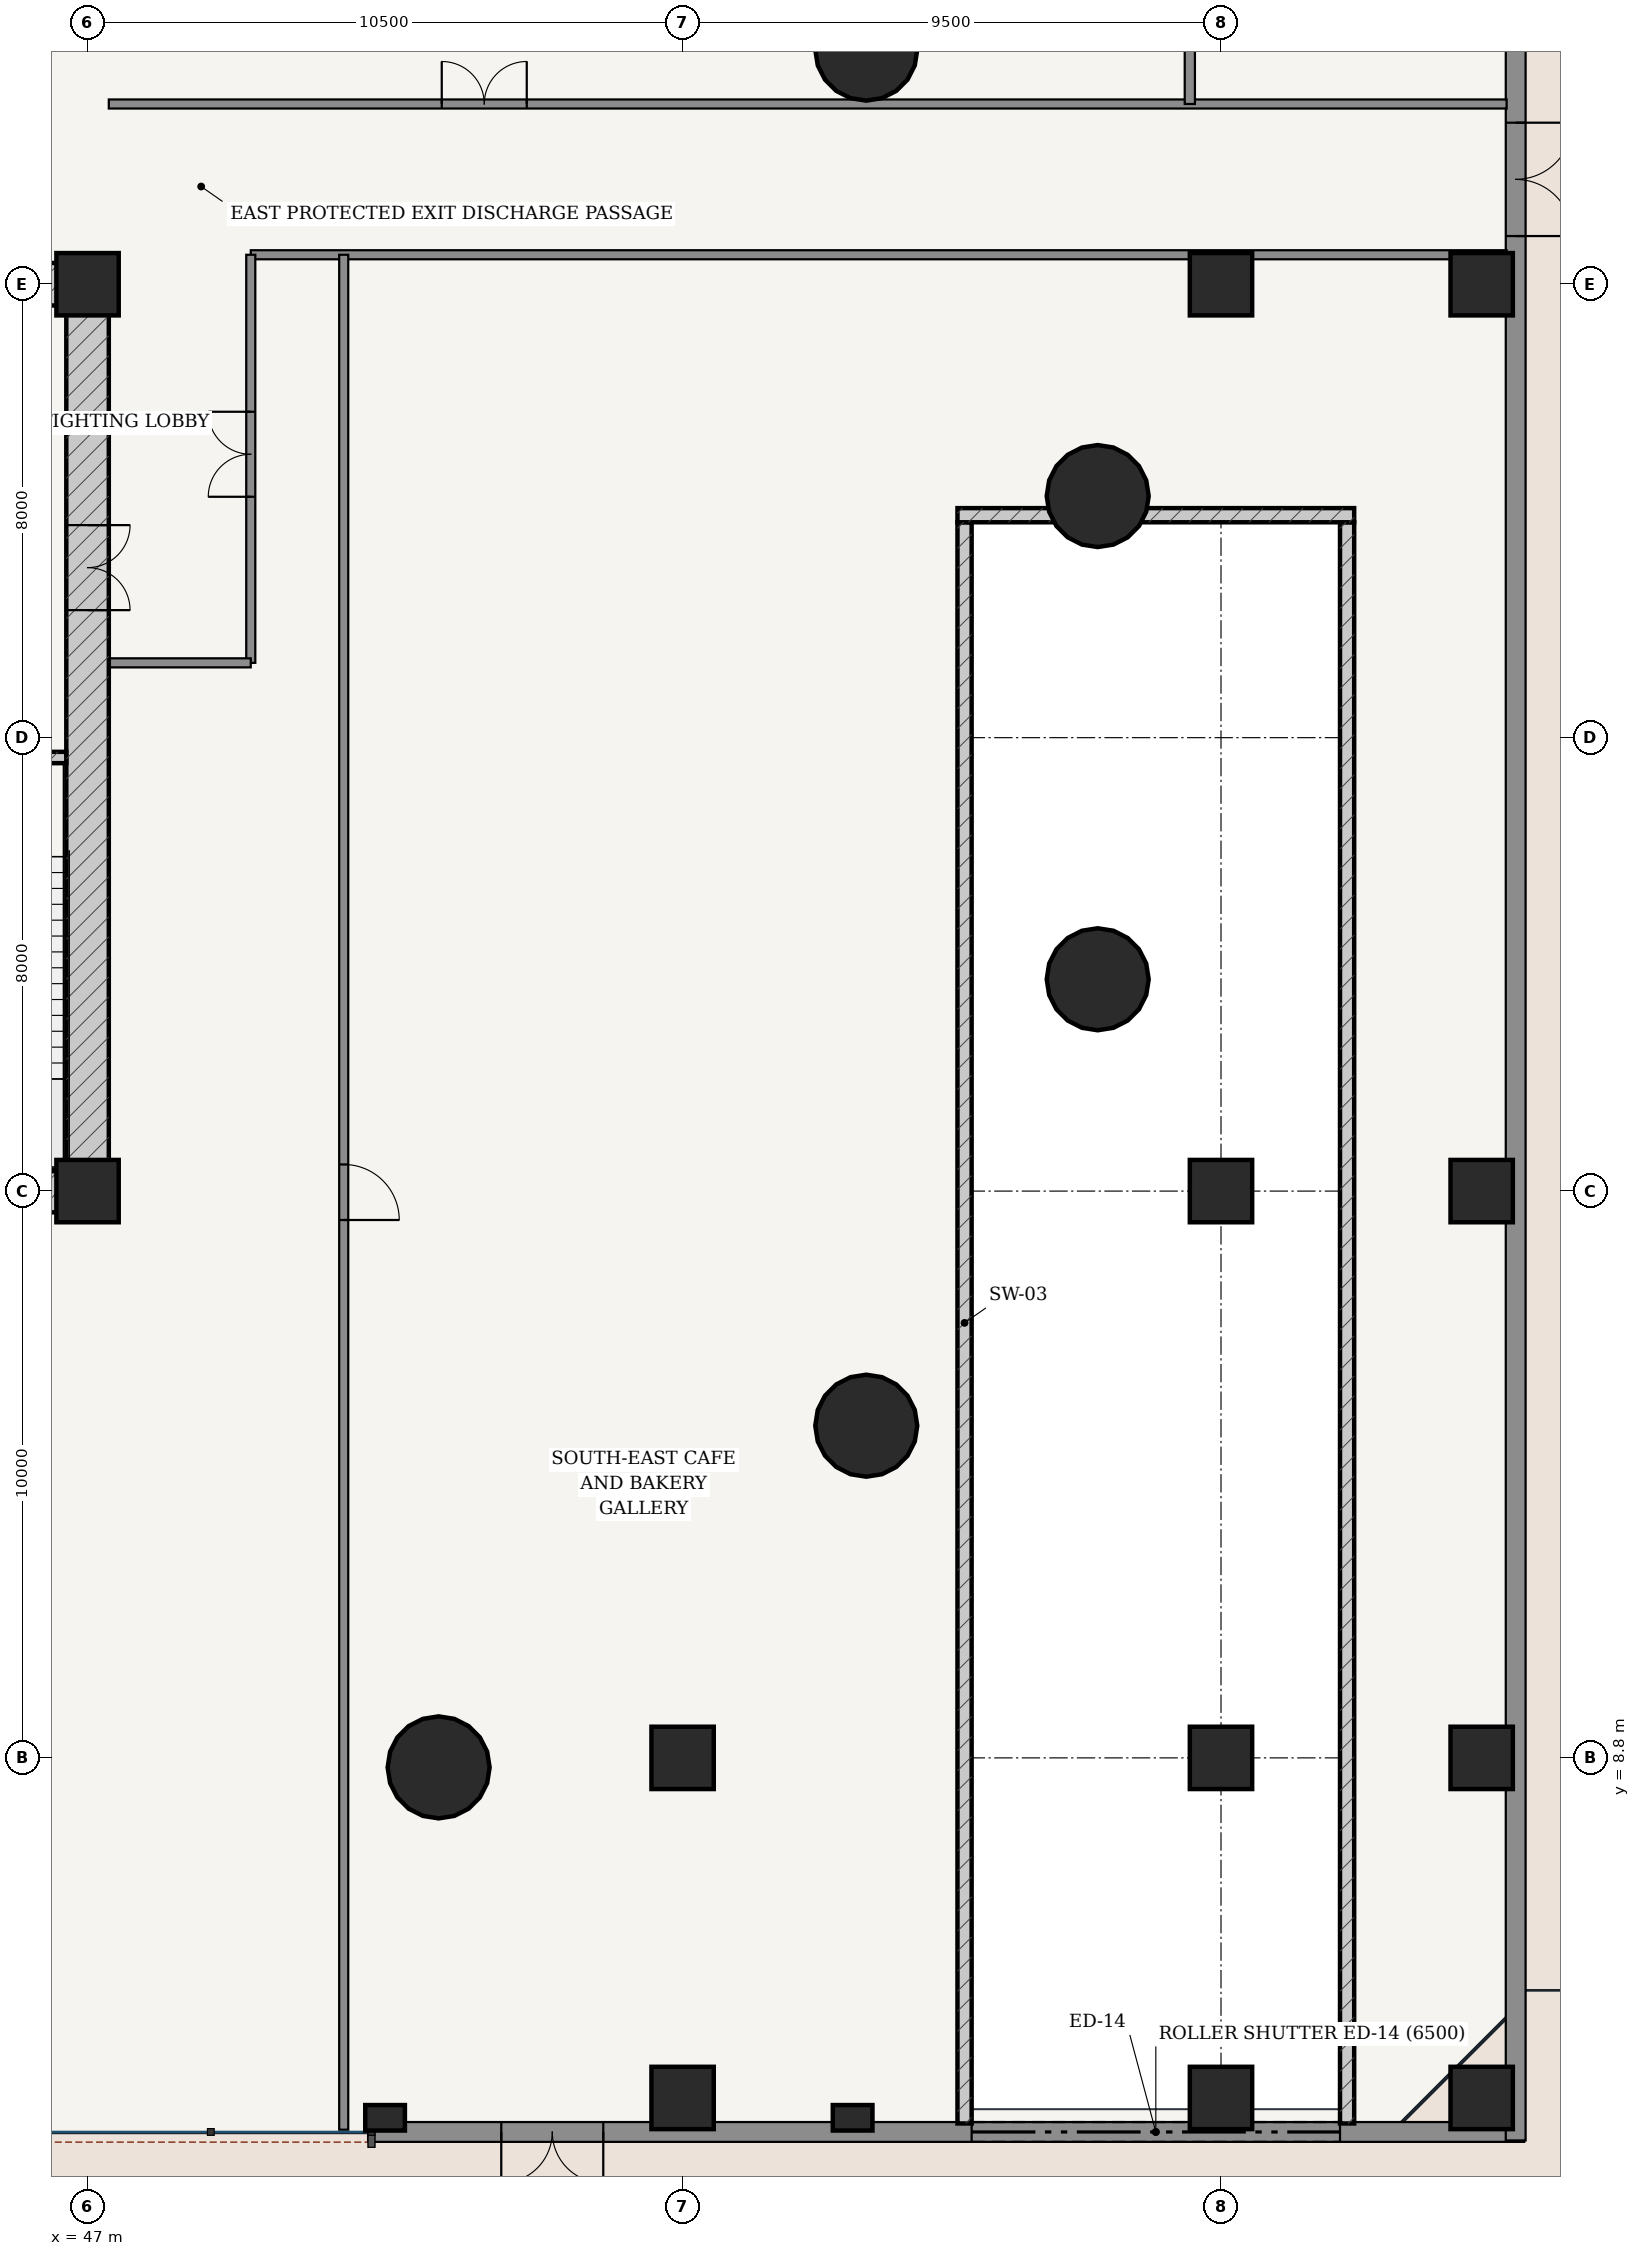
"""IFC4 building model, lengths in metres.
Left out: names, types, materials, properties, quantities, classifications, styles, units other than length and angle.
Written with IfcOpenShell. Run it as: python <this file> out.ifc"""

import sys

from ifc_helpers import new_model, si_unit, direction, frame, frame_2d, origin, origin_2d, place, context, subcontext, project, spatial, rectangle, hollow_circle, extrude, source, transform, mapped, element, fill, save


model = new_model("IFC4")
c1 = context("Model", 3, precision=1e-05, world=origin(), true_north=direction((-0.2419218956, 0.970295726276)))
c2 = subcontext(c1, "Body", "Model", "MODEL_VIEW")
j1 = project(units=[si_unit("LENGTHUNIT", "METRE"), si_unit("PLANEANGLEUNIT", "RADIAN")], contexts=[c1])
p1 = place(None, origin())
s1 = spatial("IfcSite", under=j1, at=p1, CompositionType="ELEMENT")
p2 = place(p1, origin())
s2 = spatial("IfcBuilding", under=s1, at=p2, CompositionType="ELEMENT")
p3 = place(p2, origin())
s3 = spatial("IfcBuildingStorey", under=s2, at=p3, CompositionType="ELEMENT", Elevation=0.0)
for number, where, z_axis, x_axis in (
    (1, (47.0, 18.8, 0.0), (0.0, 0.0, 1.0), (1.0, 0.0, 0.0)),
    (2, (47.0, 34.8, 0.0), (0.0, 0.0, 1.0), (1.0, 0.0, 0.0)),
):
    element("IfcColumn", number, at=place(p3, frame(where, z_axis=z_axis, x_axis=x_axis)), inside=s3, PredefinedType="COLUMN", context=c2, shape_type="SweptSolid", body=[
        extrude(rectangle(XDim=1.1, YDim=1.1, at=origin_2d()), origin(), (0.0, 0.0, 1.0), 5.4),
    ])
p4 = place(p3, frame((28.625, 18.8, 0.0), z_axis=(0.0, 0.0, 1.0), x_axis=(1.0, 0.0, 0.0)))
e3 = element("IfcWall", 3, at=p4, inside=s3, PredefinedType="SHEAR", context=c2, shape_type="SweptSolid", body=[
    extrude(rectangle(XDim=18.75, YDim=0.75, at=frame_2d((9.375, 0.0))), origin(), (0.0, 0.0, 1.0), 5.1),
])
p5 = place(p4, frame((7.627, 0.0, 0.0)))
e4 = element("IfcOpeningElement", 4, at=p5, cuts=e3, PredefinedType="OPENING", context=c2, shape_type="SweptSolid", body=[
    extrude(rectangle(XDim=0.85, YDim=2.1, at=frame_2d((0.425, 1.05))), frame((0.0, 0.385, 0.0), z_axis=(0.0, -1.0, 0.0), x_axis=(1.0, 0.0, 0.0)), (0.0, 0.0, 1.0), 0.77),
])
p6 = place(p4, frame((10.673, 0.0, 0.0)))
e5 = element("IfcOpeningElement", 5, at=p6, cuts=e3, PredefinedType="OPENING", context=c2, shape_type="SweptSolid", body=[
    extrude(rectangle(XDim=0.85, YDim=2.1, at=frame_2d((0.425, 1.05))), frame((0.0, 0.385, 0.0), z_axis=(0.0, -1.0, 0.0), x_axis=(1.0, 0.0, 0.0)), (0.0, 0.0, 1.0), 0.77),
])
p7 = place(p3, frame((28.625, 34.8, 0.0), z_axis=(0.0, 0.0, 1.0), x_axis=(1.0, 0.0, 0.0)))
e6 = element("IfcWall", 6, at=p7, inside=s3, PredefinedType="SHEAR", context=c2, shape_type="SweptSolid", body=[
    extrude(rectangle(XDim=18.75, YDim=0.75, at=frame_2d((9.375, 0.0))), origin(), (0.0, 0.0, 1.0), 5.1),
])
p8 = place(p7, frame((6.887, 0.0, 0.0)))
e7 = element("IfcOpeningElement", 7, at=p8, cuts=e6, PredefinedType="OPENING", context=c2, shape_type="SweptSolid", body=[
    extrude(rectangle(XDim=0.85, YDim=2.1, at=frame_2d((0.425, 1.05))), frame((0.0, 0.385, 0.0), z_axis=(0.0, -1.0, 0.0), x_axis=(1.0, 0.0, 0.0)), (0.0, 0.0, 1.0), 0.77),
])
p9 = place(p7, frame((8.945, 0.0, 0.0)))
e8 = element("IfcOpeningElement", 8, at=p9, cuts=e6, PredefinedType="OPENING", context=c2, shape_type="SweptSolid", body=[
    extrude(rectangle(XDim=0.86, YDim=2.1, at=frame_2d((0.43, 1.05))), frame((0.0, 0.385, 0.0), z_axis=(0.0, -1.0, 0.0), x_axis=(1.0, 0.0, 0.0)), (0.0, 0.0, 1.0), 0.77),
])
p10 = place(p7, frame((11.012, 0.0, 0.0)))
e9 = element("IfcOpeningElement", 9, at=p10, cuts=e6, PredefinedType="OPENING", context=c2, shape_type="SweptSolid", body=[
    extrude(rectangle(XDim=0.85, YDim=2.1, at=frame_2d((0.425, 1.05))), frame((0.0, 0.385, 0.0), z_axis=(0.0, -1.0, 0.0), x_axis=(1.0, 0.0, 0.0)), (0.0, 0.0, 1.0), 0.77),
])
p11 = place(p3, frame((47.0, 19.175, 0.0), z_axis=(0.0, 0.0, 1.0), x_axis=(0.0, 1.0, 0.0)))
e10 = element("IfcWall", 10, at=p11, inside=s3, PredefinedType="SHEAR", context=c2, shape_type="SweptSolid", body=[
    extrude(rectangle(XDim=15.25, YDim=0.75, at=frame_2d((7.625, 0.0))), origin(), (0.0, 0.0, 1.0), 5.1),
])
p12 = place(p11, frame((9.875, 0.0, 0.0)))
e11 = element("IfcOpeningElement", 11, at=p12, cuts=e10, PredefinedType="OPENING", context=c2, shape_type="SweptSolid", body=[
    extrude(rectangle(XDim=1.5, YDim=2.2, at=frame_2d((0.75, 1.1))), frame((0.0, 0.385, 0.0), z_axis=(0.0, -1.0, 0.0), x_axis=(1.0, 0.0, 0.0)), (0.0, 0.0, 1.0), 0.77),
])
p13 = place(p3, frame((43.305, 26.45, 0.0), z_axis=(0.0, 0.0, 1.0), x_axis=(1.0, 0.0, 0.0)))
e12 = element("IfcWall", 12, at=p13, inside=s3, PredefinedType="SOLIDWALL", context=c2, shape_type="SweptSolid", body=[
    extrude(rectangle(XDim=3.32, YDim=0.2, at=frame_2d((1.66, 0.0))), origin(), (0.0, 0.0, 1.0), 5.1),
])
p14 = place(p13, frame((1.185, 0.0, 0.0)))
e13 = element("IfcOpeningElement", 13, at=p14, cuts=e12, PredefinedType="OPENING", context=c2, shape_type="SweptSolid", body=[
    extrude(rectangle(XDim=0.95, YDim=2.15, at=frame_2d((0.475, 1.075))), frame((0.0, 0.11, 0.0), z_axis=(0.0, -1.0, 0.0), x_axis=(1.0, 0.0, 0.0)), (0.0, 0.0, 1.0), 0.22),
])
for number, where, z_axis, x_axis in (
    (14, (62.475, 2.35, 0.0), (0.0, 0.0, 1.0), (0.0, 1.0, 0.0)),
    (15, (69.225, 2.35, 0.0), (0.0, 0.0, 1.0), (0.0, 1.0, 0.0)),
):
    element("IfcWall", number, at=place(p3, frame(where, z_axis=z_axis, x_axis=x_axis)), inside=s3, PredefinedType="SOLIDWALL", context=c2, shape_type="SweptSolid", body=[
        extrude(rectangle(XDim=28.25, YDim=0.25, at=frame_2d((14.125, 0.0))), origin(), (0.0, 0.0, 1.0), 5.1),
    ])
p15 = place(p3, frame((62.35, 30.725, 0.0), z_axis=(0.0, 0.0, 1.0), x_axis=(1.0, 0.0, 0.0)))
e16 = element("IfcWall", 16, at=p15, inside=s3, PredefinedType="SOLIDWALL", context=c2, shape_type="SweptSolid", body=[
    extrude(rectangle(XDim=7.0, YDim=0.25, at=frame_2d((3.5, 0.0))), origin(), (0.0, 0.0, 1.0), 5.1),
])
for number, where, z_axis, x_axis in (
    (17, (64.824, 31.063, 0.0), (0.0, 0.0, 1.0), (1.0, 0.0, 0.0)),
    (18, (60.741, 38.939, 0.0), (0.0, 0.0, 1.0), (1.0, 0.0, 0.0)),
    (19, (53.195, 8.632, 0.0), (0.0, 0.0, 1.0), (1.0, 0.0, 0.0)),
    (20, (60.741, 14.661, 0.0), (0.0, 0.0, 1.0), (1.0, 0.0, 0.0)),
    (21, (64.824, 22.537, 0.0), (0.0, 0.0, 1.0), (1.0, 0.0, 0.0)),
):
    element("IfcColumn", number, at=place(p3, frame(where, z_axis=z_axis, x_axis=x_axis)), inside=s3, PredefinedType="COLUMN", context=c2, shape_type="SweptSolid", body=[
        extrude(hollow_circle(Radius=0.9, WallThickness=0.055, at=origin_2d()), origin(), (0.0, 0.0, 1.0), 5.4),
    ])
for number, where, z_axis, x_axis in (
    (22, (57.5, 2.8, 0.0), (0.0, 0.0, 1.0), (1.0, 0.0, 0.0)),
    (23, (57.5, 8.8, 0.0), (0.0, 0.0, 1.0), (1.0, 0.0, 0.0)),
    (24, (67.0, 2.8, 0.0), (0.0, 0.0, 1.0), (1.0, 0.0, 0.0)),
    (25, (67.0, 8.8, 0.0), (0.0, 0.0, 1.0), (1.0, 0.0, 0.0)),
    (26, (67.0, 18.8, 0.0), (0.0, 0.0, 1.0), (1.0, 0.0, 0.0)),
    (27, (67.0, 34.8, 0.0), (0.0, 0.0, 1.0), (1.0, 0.0, 0.0)),
    (28, (71.6, 2.8, 0.0), (0.0, 0.0, 1.0), (1.0, 0.0, 0.0)),
    (29, (71.6, 8.8, 0.0), (0.0, 0.0, 1.0), (1.0, 0.0, 0.0)),
    (30, (71.6, 18.8, 0.0), (0.0, 0.0, 1.0), (1.0, 0.0, 0.0)),
    (31, (71.6, 34.8, 0.0), (0.0, 0.0, 1.0), (1.0, 0.0, 0.0)),
):
    element("IfcColumn", number, at=place(p3, frame(where, z_axis=z_axis, x_axis=x_axis)), inside=s3, PredefinedType="COLUMN", context=c2, shape_type="SweptSolid", body=[
        extrude(rectangle(XDim=1.1, YDim=1.1, at=origin_2d()), origin(), (0.0, 0.0, 1.0), 5.4),
    ])
for number, where, z_axis, x_axis in (
    (32, (52.25, 2.45, 0.0), (0.0, 0.0, 1.0), (1.0, 0.0, 0.0)),
    (33, (60.5, 2.45, 0.0), (0.0, 0.0, 1.0), (1.0, 0.0, 0.0)),
):
    element("IfcColumn", number, at=place(p3, frame(where, z_axis=z_axis, x_axis=x_axis)), inside=s3, PredefinedType="PILASTER", context=c2, shape_type="SweptSolid", body=[
        extrude(rectangle(XDim=0.7, YDim=0.45, at=origin_2d()), origin(), (0.0, 0.0, 1.0), 5.4),
    ])
p16 = place(p3, frame((51.95, 2.2, 0.0), z_axis=(0.0, 0.0, 1.0), x_axis=(1.0, 0.0, 0.0)))
e34 = element("IfcWall", 34, at=p16, inside=s3, PredefinedType="SOLIDWALL", context=c2, shape_type="SweptSolid", body=[
    extrude(rectangle(XDim=20.4, YDim=0.35, at=frame_2d((10.2, 0.0))), origin(), (0.0, 0.0, 1.0), 5.1),
])
p17 = place(p16, frame((2.35, 0.0, 0.0)))
e35 = element("IfcOpeningElement", 35, at=p17, cuts=e34, PredefinedType="OPENING", context=c2, shape_type="SweptSolid", body=[
    extrude(rectangle(XDim=1.8, YDim=2.4, at=frame_2d((0.9, 1.2))), frame((0.0, 0.185, 0.0), z_axis=(0.0, -1.0, 0.0), x_axis=(1.0, 0.0, 0.0)), (0.0, 0.0, 1.0), 0.37),
])
p18 = place(p16, frame((10.65, 0.0, 0.0)))
e36 = element("IfcOpeningElement", 36, at=p18, cuts=e34, PredefinedType="OPENING", context=c2, shape_type="SweptSolid", body=[
    extrude(rectangle(XDim=6.5, YDim=2.8, at=frame_2d((3.25, 1.4))), frame((0.0, 0.185, 0.0), z_axis=(0.0, -1.0, 0.0), x_axis=(1.0, 0.0, 0.0)), (0.0, 0.0, 1.0), 0.37),
])
p19 = place(p3, frame((72.2, 2.05, 0.0), z_axis=(0.0, 0.0, 1.0), x_axis=(0.0, 1.0, 0.0)))
e37 = element("IfcWall", 37, at=p19, inside=s3, PredefinedType="SOLIDWALL", context=c2, shape_type="SweptSolid", body=[
    extrude(rectangle(XDim=49.5, YDim=0.35, at=frame_2d((24.75, 0.0))), origin(), (0.0, 0.0, 1.0), 5.1),
])
p20 = place(p19, frame((33.6, 0.0, 0.0)))
e38 = element("IfcOpeningElement", 38, at=p20, cuts=e37, PredefinedType="OPENING", context=c2, shape_type="SweptSolid", body=[
    extrude(rectangle(XDim=2.0, YDim=2.2, at=frame_2d((1.0, 1.1))), frame((0.0, 0.185, 0.0), z_axis=(0.0, -1.0, 0.0), x_axis=(1.0, 0.0, 0.0)), (0.0, 0.0, 1.0), 0.37),
])
p21 = place(p3, frame((49.88, 35.32, 0.0), z_axis=(0.0, 0.0, 1.0), x_axis=(1.0, 0.0, 0.0)))
e39 = element("IfcWall", 39, at=p21, inside=s3, PredefinedType="PARTITIONING", context=c2, shape_type="SweptSolid", body=[
    extrude(rectangle(XDim=22.16, YDim=0.16, at=frame_2d((11.08, 0.0))), origin(), (0.0, 0.0, 1.0), 4.135),
])
p22 = place(p3, frame((49.88, 28.12, 0.0), z_axis=(0.0, 0.0, 1.0), x_axis=(0.0, 1.0, 0.0)))
e40 = element("IfcWall", 40, at=p22, inside=s3, PredefinedType="PARTITIONING", context=c2, shape_type="SweptSolid", body=[
    extrude(rectangle(XDim=7.2, YDim=0.16, at=frame_2d((3.6, 0.0))), origin(), (0.0, 0.0, 1.0), 4.45),
])
p23 = place(p22, frame((2.93, 0.0, 0.0)))
e41 = element("IfcOpeningElement", 41, at=p23, cuts=e40, PredefinedType="OPENING", context=c2, shape_type="SweptSolid", body=[
    extrude(rectangle(XDim=1.5, YDim=2.2, at=frame_2d((0.75, 1.1))), frame((0.0, 0.09, 0.0), z_axis=(0.0, -1.0, 0.0), x_axis=(1.0, 0.0, 0.0)), (0.0, 0.0, 1.0), 0.18),
])
p24 = place(p3, frame((47.375, 28.12, 0.0), z_axis=(0.0, 0.0, 1.0), x_axis=(1.0, 0.0, 0.0)))
e42 = element("IfcWall", 42, at=p24, inside=s3, PredefinedType="PARTITIONING", context=c2, shape_type="SweptSolid", body=[
    extrude(rectangle(XDim=2.505, YDim=0.16, at=frame_2d((1.252, 0.0))), origin(), (0.0, 0.0, 1.0), 4.45),
])
p25 = place(p3, frame((47.375, 37.98, 0.0), z_axis=(0.0, 0.0, 1.0), x_axis=(1.0, 0.0, 0.0)))
e43 = element("IfcWall", 43, at=p25, inside=s3, PredefinedType="PARTITIONING", context=c2, shape_type="SweptSolid", body=[
    extrude(rectangle(XDim=24.665, YDim=0.16, at=frame_2d((12.333, 0.0))), origin(), (0.0, 0.0, 1.0), 4.135),
])
p26 = place(p25, frame((5.875, 0.0, 0.0)))
e44 = element("IfcOpeningElement", 44, at=p26, cuts=e43, PredefinedType="OPENING", context=c2, shape_type="SweptSolid", body=[
    extrude(rectangle(XDim=1.5, YDim=2.2, at=frame_2d((0.75, 1.1))), frame((0.0, 0.09, 0.0), z_axis=(0.0, -1.0, 0.0), x_axis=(1.0, 0.0, 0.0)), (0.0, 0.0, 1.0), 0.18),
])
p27 = place(p3, frame((51.52, 2.24, 0.0), z_axis=(0.0, 0.0, 1.0), x_axis=(0.0, 1.0, 0.0)))
e45 = element("IfcWall", 45, at=p27, inside=s3, PredefinedType="PARTITIONING", context=c2, shape_type="SweptSolid", body=[
    extrude(rectangle(XDim=33.08, YDim=0.16, at=frame_2d((16.54, 0.0))), origin(), (0.0, 0.0, 1.0), 4.45),
])
p28 = place(p27, frame((16.05, 0.0, 0.0)))
e46 = element("IfcOpeningElement", 46, at=p28, cuts=e45, PredefinedType="OPENING", context=c2, shape_type="SweptSolid", body=[
    extrude(rectangle(XDim=0.98, YDim=2.2, at=frame_2d((0.49, 1.1))), frame((0.0, 0.09, 0.0), z_axis=(0.0, -1.0, 0.0), x_axis=(1.0, 0.0, 0.0)), (0.0, 0.0, 1.0), 0.18),
])
p29 = place(p3, frame((66.45, 37.98, 0.0), z_axis=(0.0, 0.0, 1.0), x_axis=(0.0, 1.0, 0.0)))
e47 = element("IfcWall", 47, at=p29, inside=s3, PredefinedType="PARTITIONING", context=c2, shape_type="SweptSolid", body=[
    extrude(rectangle(XDim=7.72, YDim=0.18, at=frame_2d((3.86, 0.0))), origin(), (0.0, 0.0, 1.0), 4.469),
])
p30 = place(p29, frame((3.073, 0.0, 0.0)))
e48 = element("IfcOpeningElement", 48, at=p30, cuts=e47, PredefinedType="OPENING", context=c2, shape_type="SweptSolid", body=[
    extrude(rectangle(XDim=0.98, YDim=2.2, at=frame_2d((0.49, 1.1))), frame((0.0, 0.1, 0.0), z_axis=(0.0, -1.0, 0.0), x_axis=(1.0, 0.0, 0.0)), (0.0, 0.0, 1.0), 0.2),
])
m1 = source(origin(), c2, "Body", "SweptSolid", [
    extrude(rectangle(XDim=1.8, YDim=2.4, at=frame_2d((0.9, 1.2))), frame((0.0, 0.025, 0.0), z_axis=(0.0, -1.0, 0.0), x_axis=(1.0, 0.0, 0.0)), (0.0, 0.0, 1.0), 0.05),
])
p31 = place(p17, frame((1.8, 0.0, 0.0), z_axis=(0.0, 0.0, 1.0), x_axis=(-1.0, 0.0, 0.0)))
e49 = element("IfcDoor", 49, at=p31, inside=s3, OperationType="DOUBLE_DOOR_SINGLE_SWING", PredefinedType="DOOR", context=c2, shape_type="MappedRepresentation", body=[
    mapped(m1, transform((0.0, 0.0, 0.0), scale=1.0)),
])
fill(e35, e49)
m2 = source(origin(), c2, "Body", "SweptSolid", [
    extrude(rectangle(XDim=6.5, YDim=2.8, at=frame_2d((3.25, 1.4))), frame((0.0, 0.025, 0.0), z_axis=(0.0, -1.0, 0.0), x_axis=(1.0, 0.0, 0.0)), (0.0, 0.0, 1.0), 0.05),
])
p32 = place(p18, origin())
e50 = element("IfcDoor", 50, at=p32, inside=s3, OperationType="ROLLINGUP", PredefinedType="GATE", context=c2, shape_type="MappedRepresentation", body=[
    mapped(m2, transform((0.0, 0.0, 0.0), scale=1.0)),
])
fill(e36, e50)
m3 = source(origin(), c2, "Body", "SweptSolid", [
    extrude(rectangle(XDim=2.0, YDim=2.2, at=frame_2d((1.0, 1.1))), frame((0.0, 0.025, 0.0), z_axis=(0.0, -1.0, 0.0), x_axis=(1.0, 0.0, 0.0)), (0.0, 0.0, 1.0), 0.05),
])
p33 = place(p20, frame((2.0, 0.0, 0.0), z_axis=(0.0, 0.0, 1.0), x_axis=(-1.0, 0.0, 0.0)))
e51 = element("IfcDoor", 51, at=p33, inside=s3, OperationType="DOUBLE_DOOR_SINGLE_SWING", PredefinedType="DOOR", context=c2, shape_type="MappedRepresentation", body=[
    mapped(m3, transform((0.0, 0.0, 0.0), scale=1.0)),
])
fill(e38, e51)
m4 = source(origin(), c2, "Body", "SweptSolid", [
    extrude(rectangle(XDim=1.5, YDim=2.2, at=frame_2d((0.75, 1.1))), frame((0.0, 0.025, 0.0), z_axis=(0.0, -1.0, 0.0), x_axis=(1.0, 0.0, 0.0)), (0.0, 0.0, 1.0), 0.05),
])
p34 = place(p12, frame((1.5, 0.0, 0.0), z_axis=(0.0, 0.0, 1.0), x_axis=(-1.0, 0.0, 0.0)))
e52 = element("IfcDoor", 52, at=p34, inside=s3, OperationType="DOUBLE_DOOR_SINGLE_SWING", PredefinedType="DOOR", context=c2, shape_type="MappedRepresentation", body=[
    mapped(m4, transform((0.0, 0.0, 0.0), scale=1.0)),
])
fill(e11, e52)
p35 = place(p23, origin())
e53 = element("IfcDoor", 53, at=p35, inside=s3, OperationType="DOUBLE_DOOR_SINGLE_SWING", PredefinedType="DOOR", context=c2, shape_type="MappedRepresentation", body=[
    mapped(m4, transform((0.0, 0.0, 0.0), scale=1.0)),
])
fill(e41, e53)
p36 = place(p26, origin())
e54 = element("IfcDoor", 54, at=p36, inside=s3, OperationType="DOUBLE_DOOR_SINGLE_SWING", PredefinedType="DOOR", context=c2, shape_type="MappedRepresentation", body=[
    mapped(m4, transform((0.0, 0.0, 0.0), scale=1.0)),
])
fill(e44, e54)
m5 = source(origin(), c2, "Body", "SweptSolid", [
    extrude(rectangle(XDim=0.98, YDim=2.2, at=frame_2d((0.49, 1.1))), frame((0.0, 0.025, 0.0), z_axis=(0.0, -1.0, 0.0), x_axis=(1.0, 0.0, 0.0)), (0.0, 0.0, 1.0), 0.05),
])
p37 = place(p28, frame((0.98, 0.0, 0.0), z_axis=(0.0, 0.0, 1.0), x_axis=(-1.0, 0.0, 0.0)))
e55 = element("IfcDoor", 55, at=p37, inside=s3, OperationType="SINGLE_SWING_RIGHT", PredefinedType="DOOR", context=c2, shape_type="MappedRepresentation", body=[
    mapped(m5, transform((0.0, 0.0, 0.0), scale=1.0)),
])
fill(e46, e55)
save(model, sys.argv[1])
